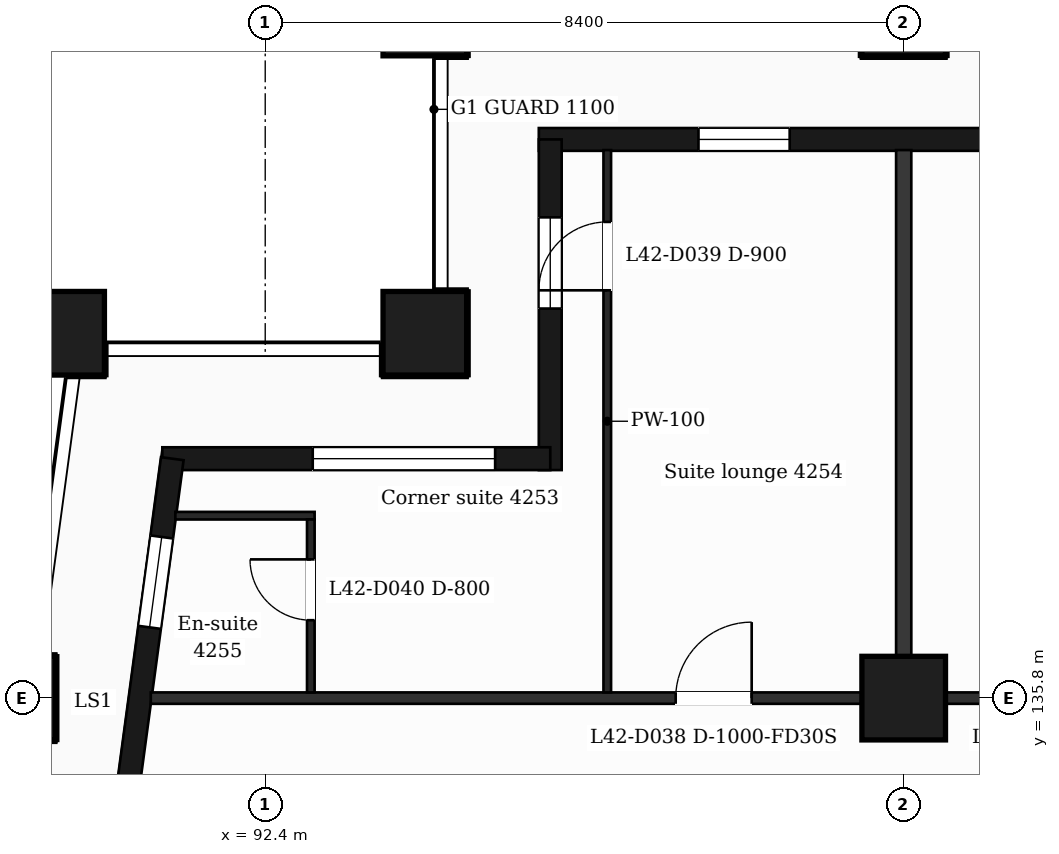
"""IFC4 building model, lengths in metres.
Left out: names, types, materials, properties, quantities, classifications, styles, units other than length and angle.
Written with IfcOpenShell. Run it as: python <this file> out.ifc"""

import sys

from ifc_helpers import new_model, si_unit, direction, frame, frame_2d, origin, origin_2d, place, context, subcontext, project, spatial, rectangle, extrude, element, fill, save


model = new_model("IFC4")
c1 = context("Model", 3, precision=1e-05, world=origin(), true_north=direction((0.0, 1.0)))
c2 = subcontext(c1, "Body", "Model", "MODEL_VIEW")
j1 = project(units=[si_unit("LENGTHUNIT", "METRE"), si_unit("PLANEANGLEUNIT", "RADIAN")], contexts=[c1])
p1 = place(None, origin())
s1 = spatial("IfcSite", under=j1, at=p1, CompositionType="ELEMENT")
p2 = place(p1, origin())
s2 = spatial("IfcBuilding", under=s1, at=p2, CompositionType="ELEMENT")
p3 = place(p2, frame((0.0, 0.0, 177.4)))
s3 = spatial("IfcBuildingStorey", under=s2, at=p3, CompositionType="ELEMENT", Elevation=177.4)
for number, where, z_axis, x_axis in (
    (1, (94.5, 140.6, 0.0), (0.0, 0.0, 1.0), (1.0, 0.0, 0.0)),
    (2, (89.735, 140.6, 0.0), (0.0, 0.0, 1.0), (1.0, 0.0, 0.0)),
    (3, (100.8, 135.8, 0.0), (0.0, 0.0, 1.0), (1.0, 0.0, 0.0)),
    (4, (89.088, 135.8, 0.0), (0.0, 0.0, 1.0), (1.0, 0.0, 0.0)),
    (5, (100.8, 144.8, 0.0), (0.0, 0.0, 1.0), (1.0, 0.0, 0.0)),
    (6, (94.5, 144.8, 0.0), (0.0, 0.0, 1.0), (1.0, 0.0, 0.0)),
):
    element("IfcColumn", number, at=place(p3, frame(where, z_axis=z_axis, x_axis=x_axis)), inside=s3, PredefinedType="COLUMN", context=c2, shape_type="SweptSolid", body=[
        extrude(rectangle(XDim=1.1, YDim=1.1, at=origin_2d()), origin(), (0.0, 0.0, 1.0), 3.7),
    ])
p4 = place(p3, frame((110.4, 143.15, 0.0), z_axis=(0.0, 0.0, 1.0), x_axis=(-1.0, 0.0, 0.0)))
e7 = element("IfcWall", 7, at=p4, inside=s3, PredefinedType="SOLIDWALL", context=c2, shape_type="SweptSolid", body=[
    extrude(rectangle(XDim=14.4, YDim=0.3, at=frame_2d((7.2, 0.0))), origin(), (0.0, 0.0, 1.0), 3.38),
])
p5 = place(p4, frame((2.1, 0.0, 0.9)))
e8 = element("IfcOpeningElement", 8, at=p5, cuts=e7, PredefinedType="OPENING", context=c2, shape_type="SweptSolid", body=[
    extrude(rectangle(XDim=2.4, YDim=2.1, at=frame_2d((1.2, 1.05))), frame((0.0, 0.16, 0.0), z_axis=(0.0, -1.0, 0.0), x_axis=(1.0, 0.0, 0.0)), (0.0, 0.0, 1.0), 0.32),
])
p6 = place(p4, frame((6.9, 0.0, 0.0)))
e9 = element("IfcOpeningElement", 9, at=p6, cuts=e7, PredefinedType="OPENING", context=c2, shape_type="SweptSolid", body=[
    extrude(rectangle(XDim=1.2, YDim=2.4, at=frame_2d((0.6, 1.2))), frame((0.0, 0.16, 0.0), z_axis=(0.0, -1.0, 0.0), x_axis=(1.0, 0.0, 0.0)), (0.0, 0.0, 1.0), 0.32),
])
p7 = place(p4, frame((11.1, 0.0, 0.9)))
e10 = element("IfcOpeningElement", 10, at=p7, cuts=e7, PredefinedType="OPENING", context=c2, shape_type="SweptSolid", body=[
    extrude(rectangle(XDim=1.2, YDim=2.1, at=frame_2d((0.6, 1.05))), frame((0.0, 0.16, 0.0), z_axis=(0.0, -1.0, 0.0), x_axis=(1.0, 0.0, 0.0)), (0.0, 0.0, 1.0), 0.32),
])
p8 = place(p3, frame((96.15, 143.15, 0.0), z_axis=(0.0, 0.0, 1.0), x_axis=(0.0, -1.0, 0.0)))
e11 = element("IfcWall", 11, at=p8, inside=s3, PredefinedType="SOLIDWALL", context=c2, shape_type="SweptSolid", body=[
    extrude(rectangle(XDim=4.35, YDim=0.3, at=frame_2d((2.175, 0.0))), origin(), (0.0, 0.0, 1.0), 3.38),
])
p9 = place(p8, frame((1.025, 0.0, 0.9)))
e12 = element("IfcOpeningElement", 12, at=p9, cuts=e11, PredefinedType="OPENING", context=c2, shape_type="SweptSolid", body=[
    extrude(rectangle(XDim=1.2, YDim=2.1, at=frame_2d((0.6, 1.05))), frame((0.0, 0.16, 0.0), z_axis=(0.0, -1.0, 0.0), x_axis=(1.0, 0.0, 0.0)), (0.0, 0.0, 1.0), 0.32),
])
p10 = place(p3, frame((96.15, 138.95, 0.0), z_axis=(0.0, 0.0, 1.0), x_axis=(-1.0, 0.0, 0.0)))
e13 = element("IfcWall", 13, at=p10, inside=s3, PredefinedType="SOLIDWALL", context=c2, shape_type="SweptSolid", body=[
    extrude(rectangle(XDim=5.104, YDim=0.3, at=frame_2d((2.552, 0.0))), origin(), (0.0, 0.0, 1.0), 3.38),
])
p11 = place(p10, frame((0.725, 0.0, 0.9)))
e14 = element("IfcOpeningElement", 14, at=p11, cuts=e13, PredefinedType="OPENING", context=c2, shape_type="SweptSolid", body=[
    extrude(rectangle(XDim=2.4, YDim=2.1, at=frame_2d((1.2, 1.05))), frame((0.0, 0.16, 0.0), z_axis=(0.0, -1.0, 0.0), x_axis=(1.0, 0.0, 0.0)), (0.0, 0.0, 1.0), 0.32),
])
p12 = place(p3, frame((91.177, 138.95, 0.0), z_axis=(0.0, 0.0, 1.0), x_axis=(-0.133426664613, -0.991058689065, 0.0)))
e15 = element("IfcWall", 15, at=p12, inside=s3, PredefinedType="SOLIDWALL", context=c2, shape_type="SweptSolid", body=[
    extrude(rectangle(XDim=6.609, YDim=0.3, at=frame_2d((3.305, 0.0))), origin(), (0.0, 0.0, 1.0), 3.38),
])
p13 = place(p12, frame((1.039, 0.0, 0.9)))
e16 = element("IfcOpeningElement", 16, at=p13, cuts=e15, PredefinedType="OPENING", context=c2, shape_type="SweptSolid", body=[
    extrude(rectangle(XDim=1.2, YDim=2.1, at=frame_2d((0.6, 1.05))), frame((0.0, 0.16, 0.0), z_axis=(0.0, -1.0, 0.0), x_axis=(1.0, 0.0, 0.0)), (0.0, 0.0, 1.0), 0.32),
])
p14 = place(p12, frame((4.294, 0.0, 0.0)))
e17 = element("IfcOpeningElement", 17, at=p14, cuts=e15, PredefinedType="OPENING", context=c2, shape_type="SweptSolid", body=[
    extrude(rectangle(XDim=1.2, YDim=2.4, at=frame_2d((0.6, 1.2))), frame((0.0, 0.16, 0.0), z_axis=(0.0, -1.0, 0.0), x_axis=(1.0, 0.0, 0.0)), (0.0, 0.0, 1.0), 0.32),
])
p15 = place(p3, frame((90.895, 135.8, 0.0), z_axis=(0.0, 0.0, 1.0), x_axis=(1.0, 0.0, 0.0)))
e18 = element("IfcWall", 18, at=p15, inside=s3, PredefinedType="PARTITIONING", context=c2, shape_type="SweptSolid", body=[
    extrude(rectangle(XDim=45.011, YDim=0.15, at=frame_2d((22.505, 0.0))), origin(), (0.0, 0.0, 1.0), 3.38),
])
p16 = place(p15, frame((6.906, 0.0, 0.0)))
e19 = element("IfcOpeningElement", 19, at=p16, cuts=e18, PredefinedType="OPENING", context=c2, shape_type="SweptSolid", body=[
    extrude(rectangle(XDim=1.0, YDim=2.1, at=frame_2d((0.5, 1.05))), frame((0.0, 0.085, 0.0), z_axis=(0.0, -1.0, 0.0), x_axis=(1.0, 0.0, 0.0)), (0.0, 0.0, 1.0), 0.17),
])
p17 = place(p15, frame((11.875, 0.0, 0.0)))
e20 = element("IfcOpeningElement", 20, at=p17, cuts=e18, PredefinedType="OPENING", context=c2, shape_type="SweptSolid", body=[
    extrude(rectangle(XDim=0.95, YDim=2.1, at=frame_2d((0.475, 1.05))), frame((0.0, 0.085, 0.0), z_axis=(0.0, -1.0, 0.0), x_axis=(1.0, 0.0, 0.0)), (0.0, 0.0, 1.0), 0.17),
])
p18 = place(p15, frame((19.292, 0.0, 0.0)))
e21 = element("IfcOpeningElement", 21, at=p18, cuts=e18, PredefinedType="OPENING", context=c2, shape_type="SweptSolid", body=[
    extrude(rectangle(XDim=0.95, YDim=2.1, at=frame_2d((0.475, 1.05))), frame((0.0, 0.085, 0.0), z_axis=(0.0, -1.0, 0.0), x_axis=(1.0, 0.0, 0.0)), (0.0, 0.0, 1.0), 0.17),
])
p19 = place(p15, frame((23.418, 0.0, 0.0)))
e22 = element("IfcOpeningElement", 22, at=p19, cuts=e18, PredefinedType="OPENING", context=c2, shape_type="SweptSolid", body=[
    extrude(rectangle(XDim=0.95, YDim=2.1, at=frame_2d((0.475, 1.05))), frame((0.0, 0.085, 0.0), z_axis=(0.0, -1.0, 0.0), x_axis=(1.0, 0.0, 0.0)), (0.0, 0.0, 1.0), 0.17),
])
p20 = place(p15, frame((29.425, 0.0, 0.0)))
e23 = element("IfcOpeningElement", 23, at=p20, cuts=e18, PredefinedType="OPENING", context=c2, shape_type="SweptSolid", body=[
    extrude(rectangle(XDim=0.95, YDim=2.1, at=frame_2d((0.475, 1.05))), frame((0.0, 0.085, 0.0), z_axis=(0.0, -1.0, 0.0), x_axis=(1.0, 0.0, 0.0)), (0.0, 0.0, 1.0), 0.17),
])
p21 = place(p15, frame((31.63, 0.0, 0.0)))
e24 = element("IfcOpeningElement", 24, at=p21, cuts=e18, PredefinedType="OPENING", context=c2, shape_type="SweptSolid", body=[
    extrude(rectangle(XDim=0.95, YDim=2.1, at=frame_2d((0.475, 1.05))), frame((0.0, 0.085, 0.0), z_axis=(0.0, -1.0, 0.0), x_axis=(1.0, 0.0, 0.0)), (0.0, 0.0, 1.0), 0.17),
])
p22 = place(p15, frame((39.814, 0.0, 0.0)))
e25 = element("IfcOpeningElement", 25, at=p22, cuts=e18, PredefinedType="OPENING", context=c2, shape_type="SweptSolid", body=[
    extrude(rectangle(XDim=0.95, YDim=2.1, at=frame_2d((0.475, 1.05))), frame((0.0, 0.085, 0.0), z_axis=(0.0, -1.0, 0.0), x_axis=(1.0, 0.0, 0.0)), (0.0, 0.0, 1.0), 0.17),
])
p23 = place(p3, frame((91.218, 138.2, 0.0), z_axis=(0.0, 0.0, 1.0), x_axis=(1.0, 0.0, 0.0)))
e26 = element("IfcWall", 26, at=p23, inside=s3, PredefinedType="PARTITIONING", context=c2, shape_type="SweptSolid", body=[
    extrude(rectangle(XDim=1.832, YDim=0.1, at=frame_2d((0.916, 0.0))), origin(), (0.0, 0.0, 1.0), 3.38),
])
p24 = place(p3, frame((93.0, 135.875, 0.0), z_axis=(0.0, 0.0, 1.0), x_axis=(0.0, 1.0, 0.0)))
e27 = element("IfcWall", 27, at=p24, inside=s3, PredefinedType="PARTITIONING", context=c2, shape_type="SweptSolid", body=[
    extrude(rectangle(XDim=2.275, YDim=0.1, at=frame_2d((1.137, 0.0))), origin(), (0.0, 0.0, 1.0), 3.38),
])
p25 = place(p24, frame((0.95, 0.0, 0.0)))
e28 = element("IfcOpeningElement", 28, at=p25, cuts=e27, PredefinedType="OPENING", context=c2, shape_type="SweptSolid", body=[
    extrude(rectangle(XDim=0.8, YDim=2.1, at=frame_2d((0.4, 1.05))), frame((0.0, 0.06, 0.0), z_axis=(0.0, -1.0, 0.0), x_axis=(1.0, 0.0, 0.0)), (0.0, 0.0, 1.0), 0.12),
])
p26 = place(p3, frame((96.9, 135.875, 0.0), z_axis=(0.0, 0.0, 1.0), x_axis=(0.0, 1.0, 0.0)))
e29 = element("IfcWall", 29, at=p26, inside=s3, PredefinedType="PARTITIONING", context=c2, shape_type="SweptSolid", body=[
    extrude(rectangle(XDim=7.135, YDim=0.1, at=frame_2d((3.567, 0.0))), origin(), (0.0, 0.0, 1.0), 3.38),
])
p27 = place(p26, frame((5.29, 0.0, 0.0)))
e30 = element("IfcOpeningElement", 30, at=p27, cuts=e29, PredefinedType="OPENING", context=c2, shape_type="SweptSolid", body=[
    extrude(rectangle(XDim=0.9, YDim=2.1, at=frame_2d((0.45, 1.05))), frame((0.0, 0.06, 0.0), z_axis=(0.0, -1.0, 0.0), x_axis=(1.0, 0.0, 0.0)), (0.0, 0.0, 1.0), 0.12),
])
p28 = place(p3, frame((100.8, 135.875, 0.0), z_axis=(0.0, 0.0, 1.0), x_axis=(0.0, 1.0, 0.0)))
e31 = element("IfcWall", 31, at=p28, inside=s3, PredefinedType="PARTITIONING", context=c2, shape_type="SweptSolid", body=[
    extrude(rectangle(XDim=7.135, YDim=0.2, at=frame_2d((3.567, 0.0))), origin(), (0.0, 0.0, 1.0), 3.38),
])
p29 = place(p7, origin())
e32 = element("IfcWindow", 32, at=p29, inside=s3, PartitioningType="SINGLE_PANEL", PredefinedType="WINDOW", context=c2, shape_type="SweptSolid", body=[
    extrude(rectangle(XDim=1.2, YDim=2.1, at=frame_2d((0.6, 1.05))), frame((0.0, 0.03, 0.0), z_axis=(0.0, -1.0, 0.0), x_axis=(1.0, 0.0, 0.0)), (0.0, 0.0, 1.0), 0.06),
])
fill(e10, e32)
p30 = place(p9, origin())
e33 = element("IfcWindow", 33, at=p30, inside=s3, PartitioningType="SINGLE_PANEL", PredefinedType="WINDOW", context=c2, shape_type="SweptSolid", body=[
    extrude(rectangle(XDim=1.2, YDim=2.1, at=frame_2d((0.6, 1.05))), frame((0.0, 0.03, 0.0), z_axis=(0.0, -1.0, 0.0), x_axis=(1.0, 0.0, 0.0)), (0.0, 0.0, 1.0), 0.06),
])
fill(e12, e33)
p31 = place(p11, origin())
e34 = element("IfcWindow", 34, at=p31, inside=s3, PartitioningType="SINGLE_PANEL", PredefinedType="WINDOW", context=c2, shape_type="SweptSolid", body=[
    extrude(rectangle(XDim=2.4, YDim=2.1, at=frame_2d((1.2, 1.05))), frame((0.0, 0.03, 0.0), z_axis=(0.0, -1.0, 0.0), x_axis=(1.0, 0.0, 0.0)), (0.0, 0.0, 1.0), 0.06),
])
fill(e14, e34)
p32 = place(p13, origin())
e35 = element("IfcWindow", 35, at=p32, inside=s3, PartitioningType="SINGLE_PANEL", PredefinedType="WINDOW", context=c2, shape_type="SweptSolid", body=[
    extrude(rectangle(XDim=1.2, YDim=2.1, at=frame_2d((0.6, 1.05))), frame((0.0, 0.03, 0.0), z_axis=(0.0, -1.0, 0.0), x_axis=(1.0, 0.0, 0.0)), (0.0, 0.0, 1.0), 0.06),
])
fill(e16, e35)
p33 = place(p16, origin())
e36 = element("IfcDoor", 36, at=p33, inside=s3, OperationType="SINGLE_SWING_RIGHT", PredefinedType="DOOR", context=c2, shape_type="SweptSolid", body=[
    extrude(rectangle(XDim=1.0, YDim=2.1, at=frame_2d((0.5, 1.05))), frame((0.0, 0.025, 0.0), z_axis=(0.0, -1.0, 0.0), x_axis=(1.0, 0.0, 0.0)), (0.0, 0.0, 1.0), 0.05),
])
fill(e19, e36)
p34 = place(p27, origin())
e37 = element("IfcDoor", 37, at=p34, inside=s3, OperationType="SINGLE_SWING_LEFT", PredefinedType="DOOR", context=c2, shape_type="SweptSolid", body=[
    extrude(rectangle(XDim=0.9, YDim=2.1, at=frame_2d((0.45, 1.05))), frame((0.0, 0.025, 0.0), z_axis=(0.0, -1.0, 0.0), x_axis=(1.0, 0.0, 0.0)), (0.0, 0.0, 1.0), 0.05),
])
fill(e30, e37)
p35 = place(p25, origin())
e38 = element("IfcDoor", 38, at=p35, inside=s3, OperationType="SINGLE_SWING_RIGHT", PredefinedType="DOOR", context=c2, shape_type="SweptSolid", body=[
    extrude(rectangle(XDim=0.8, YDim=2.1, at=frame_2d((0.4, 1.05))), frame((0.0, 0.025, 0.0), z_axis=(0.0, -1.0, 0.0), x_axis=(1.0, 0.0, 0.0)), (0.0, 0.0, 1.0), 0.05),
])
fill(e28, e38)
save(model, sys.argv[1])
